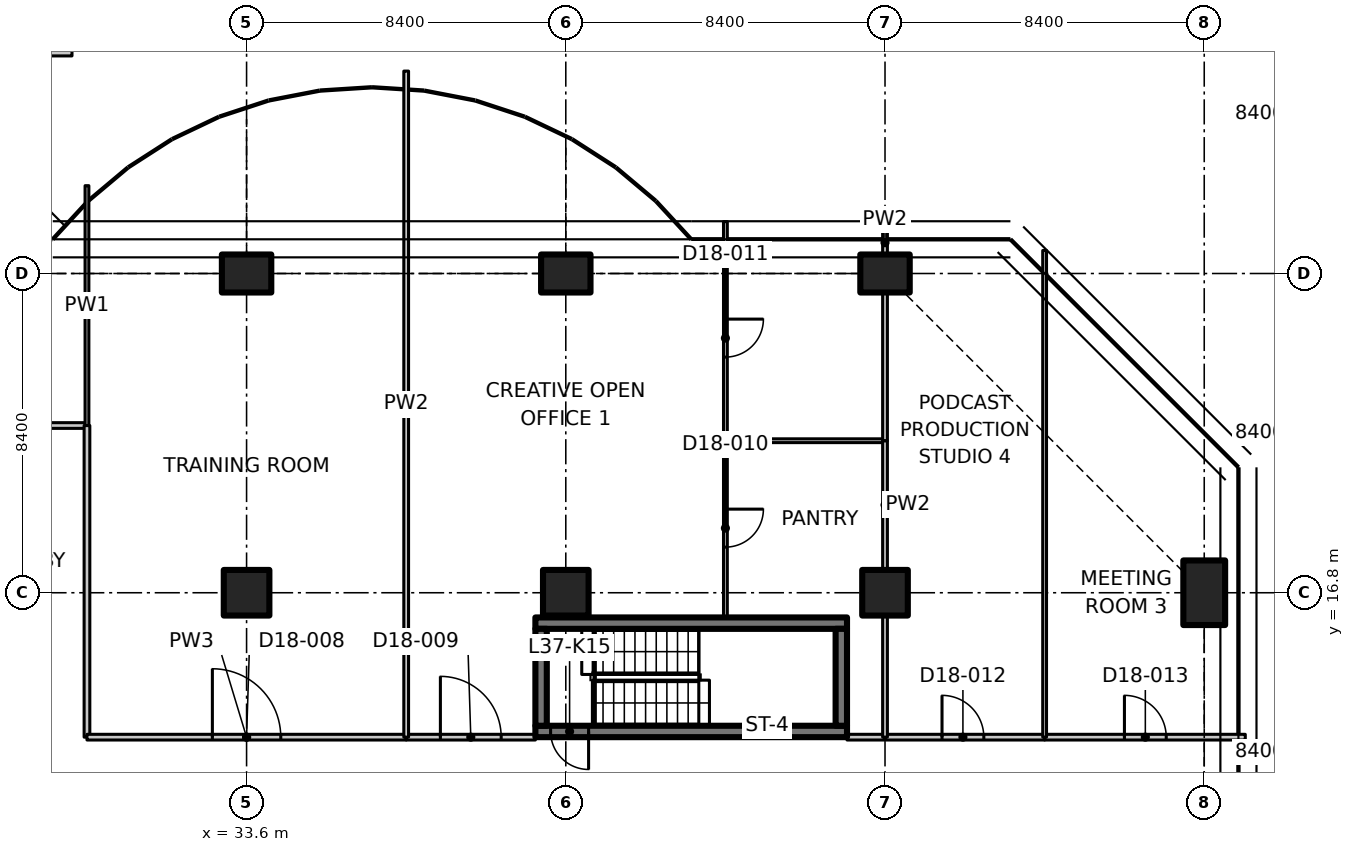
"""IFC4 building model, lengths in metres.
Left out: names, types, materials, properties, quantities, classifications, styles, units other than length and angle.
Written with IfcOpenShell. Run it as: python <this file> out.ifc"""

import sys

from ifc_helpers import new_model, si_unit, direction, frame, frame_2d, origin, origin_2d, place, context, subcontext, project, spatial, polyline, rectangle, outline, extrude, element, fill, save


model = new_model("IFC4")
c1 = context("Model", 3, precision=1e-05, world=origin(), true_north=direction((0.0, 1.0)))
c2 = subcontext(c1, "Body", "Model", "MODEL_VIEW")
j1 = project(units=[si_unit("LENGTHUNIT", "METRE"), si_unit("PLANEANGLEUNIT", "RADIAN")], contexts=[c1])
p1 = place(None, origin())
s1 = spatial("IfcSite", under=j1, at=p1, CompositionType="ELEMENT")
p2 = place(p1, origin())
s2 = spatial("IfcBuilding", under=s1, at=p2, CompositionType="ELEMENT")
p3 = place(p2, frame((0.0, 0.0, 149.3)))
s3 = spatial("IfcBuildingStorey", under=s2, at=p3, CompositionType="ELEMENT", Elevation=149.3)
p4 = place(p3, frame((33.6, 16.8, 0.0), z_axis=(0.0, 0.0, 1.0), x_axis=(1.0, 0.0, 0.0)))
e1 = element("IfcColumn", 1, at=p4, inside=s3, PredefinedType="COLUMN", context=c2, shape_type="SweptSolid", body=[
    extrude(rectangle(XDim=1.2, YDim=1.2, at=origin_2d()), origin(), (0.0, 0.0, 1.0), 3.35),
])
p5 = place(p3, frame((33.6, 25.2, 0.0), z_axis=(0.0, 0.0, 1.0), x_axis=(0.0, 1.0, 0.0)))
e2 = element("IfcColumn", 2, at=p5, inside=s3, PredefinedType="COLUMN", context=c2, shape_type="SweptSolid", body=[
    extrude(rectangle(XDim=1.0, YDim=1.3, at=origin_2d()), origin(), (0.0, 0.0, 1.0), 3.35),
])
p6 = place(p3, frame((42.0, 16.8, 0.0), z_axis=(0.0, 0.0, 1.0), x_axis=(1.0, 0.0, 0.0)))
e3 = element("IfcColumn", 3, at=p6, inside=s3, PredefinedType="COLUMN", context=c2, shape_type="SweptSolid", body=[
    extrude(rectangle(XDim=1.2, YDim=1.2, at=origin_2d()), origin(), (0.0, 0.0, 1.0), 3.35),
])
p7 = place(p3, frame((42.0, 25.2, 0.0), z_axis=(0.0, 0.0, 1.0), x_axis=(0.0, 1.0, 0.0)))
e4 = element("IfcColumn", 4, at=p7, inside=s3, PredefinedType="COLUMN", context=c2, shape_type="SweptSolid", body=[
    extrude(rectangle(XDim=1.0, YDim=1.3, at=origin_2d()), origin(), (0.0, 0.0, 1.0), 3.35),
])
p8 = place(p3, frame((50.4, 16.8, 0.0), z_axis=(0.0, 0.0, 1.0), x_axis=(1.0, 0.0, 0.0)))
e5 = element("IfcColumn", 5, at=p8, inside=s3, PredefinedType="COLUMN", context=c2, shape_type="SweptSolid", body=[
    extrude(rectangle(XDim=1.2, YDim=1.2, at=origin_2d()), origin(), (0.0, 0.0, 1.0), 3.35),
])
p9 = place(p3, frame((50.4, 25.2, 0.0), z_axis=(0.0, 0.0, 1.0), x_axis=(0.0, 1.0, 0.0)))
e6 = element("IfcColumn", 6, at=p9, inside=s3, PredefinedType="COLUMN", context=c2, shape_type="SweptSolid", body=[
    extrude(rectangle(XDim=1.0, YDim=1.3, at=origin_2d()), origin(), (0.0, 0.0, 1.0), 3.35),
])
p10 = place(p3, frame((58.8, 16.8, 0.0), z_axis=(0.0, 0.0, 1.0), x_axis=(1.0, 0.0, 0.0)))
e7 = element("IfcColumn", 7, at=p10, inside=s3, PredefinedType="COLUMN", context=c2, shape_type="SweptSolid", body=[
    extrude(rectangle(XDim=1.1, YDim=1.7, at=origin_2d()), origin(), (0.0, 0.0, 1.0), 3.35),
])
p11 = place(p3, frame((49.4, 13.15, 0.0), z_axis=(0.0, 0.0, 1.0), x_axis=(-1.0, 0.0, 0.0)))
e8 = element("IfcWall", 8, at=p11, inside=s3, PredefinedType="SHEAR", context=c2, shape_type="SweptSolid", body=[
    extrude(rectangle(XDim=8.2, YDim=0.3, at=frame_2d((4.1, 0.0))), origin(), (0.0, 0.0, 1.0), 3.35),
])
p12 = place(p11, frame((6.8, 0.0, 0.0)))
e9 = element("IfcOpeningElement", 9, at=p12, cuts=e8, PredefinedType="OPENING", context=c2, shape_type="SweptSolid", body=[
    extrude(rectangle(XDim=1.0, YDim=2.1, at=frame_2d((0.5, 1.05))), frame((0.0, 0.16, 0.0), z_axis=(0.0, -1.0, 0.0), x_axis=(1.0, 0.0, 0.0)), (0.0, 0.0, 1.0), 0.32),
])
p13 = place(p3, frame((41.2, 16.0, 0.0), z_axis=(0.0, 0.0, 1.0), x_axis=(1.0, 0.0, 0.0)))
e10 = element("IfcWall", 10, at=p13, inside=s3, PredefinedType="SHEAR", context=c2, shape_type="SweptSolid", body=[
    extrude(rectangle(XDim=8.2, YDim=0.3, at=frame_2d((4.1, 0.0))), origin(), (0.0, 0.0, 1.0), 3.35),
])
for number, where, z_axis, x_axis in (
    (11, (41.35, 13.3, 0.0), (0.0, 0.0, 1.0), (0.0, 1.0, 0.0)),
    (12, (49.25, 13.3, 0.0), (0.0, 0.0, 1.0), (0.0, 1.0, 0.0)),
):
    element("IfcWall", number, at=place(p3, frame(where, z_axis=z_axis, x_axis=x_axis)), inside=s3, PredefinedType="SHEAR", context=c2, shape_type="SweptSolid", body=[
        extrude(rectangle(XDim=2.55, YDim=0.3, at=frame_2d((1.275, 0.0))), origin(), (0.0, 0.0, 1.0), 3.35),
    ])
p14 = place(p3, frame((25.2, 21.2, 0.0), z_axis=(0.0, 0.0, 1.0), x_axis=(1.0, 0.0, 0.0)))
e13 = element("IfcWall", 13, at=p14, inside=s3, PredefinedType="PARTITIONING", context=c2, shape_type="SweptSolid", body=[
    extrude(rectangle(XDim=4.2, YDim=0.15, at=frame_2d((2.1, 0.0))), origin(), (0.0, 0.0, 1.0), 3.33),
])
p15 = place(p3, frame((29.4, 21.2, 0.0), z_axis=(0.0, 0.0, 1.0), x_axis=(0.0, -1.0, 0.0)))
e14 = element("IfcWall", 14, at=p15, inside=s3, PredefinedType="PARTITIONING", context=c2, shape_type="SweptSolid", body=[
    extrude(rectangle(XDim=8.2, YDim=0.15, at=frame_2d((4.1, 0.0))), origin(), (0.0, 0.0, 1.0), 3.33),
])
p16 = place(p3, frame((29.4, 27.511, 0.0), z_axis=(0.0, 0.0, 1.0), x_axis=(0.0, -1.0, 0.0)))
e15 = element("IfcWall", 15, at=p16, inside=s3, PredefinedType="PARTITIONING", context=c2, shape_type="SweptSolid", body=[
    extrude(outline(polyline([(0.0, 0.0), (6.311, 0.0), (6.311, 3.33), (2.761, 3.33), (2.759, 2.98), (1.863, 2.98), (1.861, 3.33), (0.236, 3.33), (0.0, 3.33), (0.0, 0.0)])), frame((0.0, 0.05, 0.0), z_axis=(0.0, -1.0, 0.0), x_axis=(1.0, 0.0, 0.0)), (0.0, 0.0, 1.0), 0.1),
])
p17 = place(p3, frame((25.2, 31.0, 0.0), z_axis=(0.0, 0.0, 1.0), x_axis=(1.0, 0.0, 0.0)))
e16 = element("IfcWall", 16, at=p17, inside=s3, PredefinedType="PARTITIONING", context=c2, shape_type="SweptSolid", body=[
    extrude(rectangle(XDim=3.806, YDim=0.15, at=frame_2d((1.903, 0.0))), origin(), (0.0, 0.0, 1.0), 2.98),
])
p18 = place(p3, frame((29.4, 13.0, 0.0), z_axis=(0.0, 0.0, 1.0), x_axis=(1.0, 0.0, 0.0)))
e17 = element("IfcWall", 17, at=p18, inside=s3, PredefinedType="PARTITIONING", context=c2, shape_type="SweptSolid", body=[
    extrude(rectangle(XDim=8.4, YDim=0.15, at=frame_2d((4.2, 0.0))), origin(), (0.0, 0.0, 1.0), 3.33),
])
p19 = place(p18, frame((3.3, 0.0, 0.0)))
e18 = element("IfcOpeningElement", 18, at=p19, cuts=e17, PredefinedType="OPENING", context=c2, shape_type="SweptSolid", body=[
    extrude(rectangle(XDim=1.8, YDim=2.1, at=frame_2d((0.9, 1.05))), frame((0.0, 0.085, 0.0), z_axis=(0.0, -1.0, 0.0), x_axis=(1.0, 0.0, 0.0)), (0.0, 0.0, 1.0), 0.17),
])
p20 = place(p3, frame((37.8, 13.0, 0.0), z_axis=(0.0, 0.0, 1.0), x_axis=(1.0, 0.0, 0.0)))
e19 = element("IfcWall", 19, at=p20, inside=s3, PredefinedType="PARTITIONING", context=c2, shape_type="SweptSolid", body=[
    extrude(rectangle(XDim=3.4, YDim=0.15, at=frame_2d((1.7, 0.0))), origin(), (0.0, 0.0, 1.0), 3.33),
])
p21 = place(p20, frame((0.9, 0.0, 0.0)))
e20 = element("IfcOpeningElement", 20, at=p21, cuts=e19, PredefinedType="OPENING", context=c2, shape_type="SweptSolid", body=[
    extrude(rectangle(XDim=1.6, YDim=2.1, at=frame_2d((0.8, 1.05))), frame((0.0, 0.085, 0.0), z_axis=(0.0, -1.0, 0.0), x_axis=(1.0, 0.0, 0.0)), (0.0, 0.0, 1.0), 0.17),
])
p22 = place(p3, frame((49.4, 13.0, 0.0), z_axis=(0.0, 0.0, 1.0), x_axis=(1.0, 0.0, 0.0)))
e21 = element("IfcWall", 21, at=p22, inside=s3, PredefinedType="PARTITIONING", context=c2, shape_type="SweptSolid", body=[
    extrude(rectangle(XDim=1.0, YDim=0.15, at=frame_2d((0.5, 0.0))), origin(), (0.0, 0.0, 1.0), 3.33),
])
p23 = place(p3, frame((50.4, 13.0, 0.0), z_axis=(0.0, 0.0, 1.0), x_axis=(1.0, 0.0, 0.0)))
e22 = element("IfcWall", 22, at=p23, inside=s3, PredefinedType="PARTITIONING", context=c2, shape_type="SweptSolid", body=[
    extrude(rectangle(XDim=4.2, YDim=0.15, at=frame_2d((2.1, 0.0))), origin(), (0.0, 0.0, 1.0), 3.33),
])
p24 = place(p23, frame((1.5, 0.0, 0.0)))
e23 = element("IfcOpeningElement", 23, at=p24, cuts=e22, PredefinedType="OPENING", context=c2, shape_type="SweptSolid", body=[
    extrude(rectangle(XDim=1.1, YDim=2.1, at=frame_2d((0.55, 1.05))), frame((0.0, 0.085, 0.0), z_axis=(0.0, -1.0, 0.0), x_axis=(1.0, 0.0, 0.0)), (0.0, 0.0, 1.0), 0.17),
])
p25 = place(p3, frame((54.6, 13.0, 0.0), z_axis=(0.0, 0.0, 1.0), x_axis=(1.0, 0.0, 0.0)))
e24 = element("IfcWall", 24, at=p25, inside=s3, PredefinedType="PARTITIONING", context=c2, shape_type="SweptSolid", body=[
    extrude(outline(polyline([(0.0, 0.0), (5.28, 0.0), (5.28, 3.33), (4.65, 3.33), (4.648, 2.98), (3.752, 2.98), (3.75, 3.33), (0.0, 3.33), (0.0, 0.0)])), frame((0.0, 0.075, 0.0), z_axis=(0.0, -1.0, 0.0), x_axis=(1.0, 0.0, 0.0)), (0.0, 0.0, 1.0), 0.15),
])
p26 = place(p25, frame((2.1, 0.0, 0.0)))
e25 = element("IfcOpeningElement", 25, at=p26, cuts=e24, PredefinedType="OPENING", context=c2, shape_type="SweptSolid", body=[
    extrude(rectangle(XDim=1.1, YDim=2.1, at=frame_2d((0.55, 1.05))), frame((0.0, 0.085, 0.0), z_axis=(0.0, -1.0, 0.0), x_axis=(1.0, 0.0, 0.0)), (0.0, 0.0, 1.0), 0.17),
])
p27 = place(p3, frame((37.8, 30.526, 0.0), z_axis=(0.0, 0.0, 1.0), x_axis=(0.0, -1.0, 0.0)))
e26 = element("IfcWall", 26, at=p27, inside=s3, PredefinedType="PARTITIONING", context=c2, shape_type="SweptSolid", body=[
    extrude(outline(polyline([(0.0, 0.0), (17.526, 0.0), (17.526, 3.33), (5.776, 3.33), (5.774, 2.98), (4.878, 2.98), (4.876, 3.33), (0.283, 3.33), (0.0, 3.33), (0.0, 0.0)])), frame((0.0, 0.062, 0.0), z_axis=(0.0, -1.0, 0.0), x_axis=(1.0, 0.0, 0.0)), (0.0, 0.0, 1.0), 0.125),
])
p28 = place(p3, frame((46.2, 20.8, 0.0), z_axis=(0.0, 0.0, 1.0), x_axis=(0.0, -1.0, 0.0)))
e27 = element("IfcWall", 27, at=p28, inside=s3, PredefinedType="PARTITIONING", context=c2, shape_type="SweptSolid", body=[
    extrude(rectangle(XDim=4.65, YDim=0.1, at=frame_2d((2.325, 0.0))), origin(), (0.0, 0.0, 1.0), 3.33),
])
p29 = place(p28, frame((1.8, 0.0, 0.0)))
e28 = element("IfcOpeningElement", 28, at=p29, cuts=e27, PredefinedType="OPENING", context=c2, shape_type="SweptSolid", body=[
    extrude(rectangle(XDim=1.0, YDim=2.1, at=frame_2d((0.5, 1.05))), frame((0.0, 0.06, 0.0), z_axis=(0.0, -1.0, 0.0), x_axis=(1.0, 0.0, 0.0)), (0.0, 0.0, 1.0), 0.12),
])
p30 = place(p3, frame((46.2, 26.565, 0.0), z_axis=(0.0, 0.0, 1.0), x_axis=(0.0, -1.0, 0.0)))
e29 = element("IfcWall", 29, at=p30, inside=s3, PredefinedType="PARTITIONING", context=c2, shape_type="SweptSolid", body=[
    extrude(outline(polyline([(0.0, 0.0), (5.765, 0.0), (5.765, 3.33), (1.815, 3.33), (1.813, 2.98), (0.917, 2.98), (0.915, 3.33), (0.265, 3.33), (0.0, 3.33), (0.0, 0.0)])), frame((0.0, 0.05, 0.0), z_axis=(0.0, -1.0, 0.0), x_axis=(1.0, 0.0, 0.0)), (0.0, 0.0, 1.0), 0.1),
])
p31 = place(p30, frame((2.565, 0.0, 0.0)))
e30 = element("IfcOpeningElement", 30, at=p31, cuts=e29, PredefinedType="OPENING", context=c2, shape_type="SweptSolid", body=[
    extrude(rectangle(XDim=1.0, YDim=2.1, at=frame_2d((0.5, 1.05))), frame((0.0, 0.06, 0.0), z_axis=(0.0, -1.0, 0.0), x_axis=(1.0, 0.0, 0.0)), (0.0, 0.0, 1.0), 0.12),
])
p32 = place(p3, frame((46.2, 20.8, 0.0), z_axis=(0.0, 0.0, 1.0), x_axis=(1.0, 0.0, 0.0)))
e31 = element("IfcWall", 31, at=p32, inside=s3, PredefinedType="PARTITIONING", context=c2, shape_type="SweptSolid", body=[
    extrude(rectangle(XDim=4.2, YDim=0.1, at=frame_2d((2.1, 0.0))), origin(), (0.0, 0.0, 1.0), 3.33),
])
p33 = place(p3, frame((50.4, 20.8, 0.0), z_axis=(0.0, 0.0, 1.0), x_axis=(0.0, -1.0, 0.0)))
e32 = element("IfcWall", 32, at=p33, inside=s3, PredefinedType="PARTITIONING", context=c2, shape_type="SweptSolid", body=[
    extrude(rectangle(XDim=3.38, YDim=0.125, at=frame_2d((1.69, 0.0))), origin(), (0.0, 0.0, 1.0), 3.33),
])
p34 = place(p3, frame((50.4, 16.18, 0.0), z_axis=(0.0, 0.0, 1.0), x_axis=(0.0, -1.0, 0.0)))
e33 = element("IfcWall", 33, at=p34, inside=s3, PredefinedType="PARTITIONING", context=c2, shape_type="SweptSolid", body=[
    extrude(rectangle(XDim=3.18, YDim=0.125, at=frame_2d((1.59, 0.0))), origin(), (0.0, 0.0, 1.0), 3.33),
])
p35 = place(p3, frame((50.4, 26.3, 0.0), z_axis=(0.0, 0.0, 1.0), x_axis=(0.0, -1.0, 0.0)))
e34 = element("IfcWall", 34, at=p35, inside=s3, PredefinedType="PARTITIONING", context=c2, shape_type="SweptSolid", body=[
    extrude(rectangle(XDim=0.58, YDim=0.125, at=frame_2d((0.29, 0.0))), origin(), (0.0, 0.0, 1.0), 3.33),
])
p36 = place(p3, frame((50.4, 24.68, 0.0), z_axis=(0.0, 0.0, 1.0), x_axis=(0.0, -1.0, 0.0)))
e35 = element("IfcWall", 35, at=p36, inside=s3, PredefinedType="PARTITIONING", context=c2, shape_type="SweptSolid", body=[
    extrude(rectangle(XDim=3.88, YDim=0.125, at=frame_2d((1.94, 0.0))), origin(), (0.0, 0.0, 1.0), 2.98),
])
p37 = place(p3, frame((54.6, 25.805, 0.0), z_axis=(0.0, 0.0, 1.0), x_axis=(0.0, -1.0, 0.0)))
e36 = element("IfcWall", 36, at=p37, inside=s3, PredefinedType="PARTITIONING", context=c2, shape_type="SweptSolid", body=[
    extrude(outline(polyline([(0.0, 0.0), (12.805, 0.0), (12.805, 3.33), (5.471, 3.33), (5.469, 2.98), (4.142, 2.98), (4.14, 3.33), (0.406, 3.33), (0.0, 3.33), (0.0, 0.0)])), frame((0.0, 0.05, 0.0), z_axis=(0.0, -1.0, 0.0), x_axis=(1.0, 0.0, 0.0)), (0.0, 0.0, 1.0), 0.1),
])
p38 = place(p12, origin())
e37 = element("IfcDoor", 37, at=p38, inside=s3, OperationType="SINGLE_SWING_LEFT", PredefinedType="DOOR", context=c2, shape_type="SweptSolid", body=[
    extrude(rectangle(XDim=1.0, YDim=2.1, at=frame_2d((0.5, 1.05))), frame((0.0, 0.025, 0.0), z_axis=(0.0, -1.0, 0.0), x_axis=(1.0, 0.0, 0.0)), (0.0, 0.0, 1.0), 0.05),
])
fill(e9, e37)
p39 = place(p19, origin())
e38 = element("IfcDoor", 38, at=p39, inside=s3, OperationType="DOUBLE_DOOR_SINGLE_SWING", PredefinedType="DOOR", context=c2, shape_type="SweptSolid", body=[
    extrude(rectangle(XDim=1.8, YDim=2.1, at=frame_2d((0.9, 1.05))), frame((0.0, 0.025, 0.0), z_axis=(0.0, -1.0, 0.0), x_axis=(1.0, 0.0, 0.0)), (0.0, 0.0, 1.0), 0.05),
])
fill(e18, e38)
p40 = place(p21, origin())
e39 = element("IfcDoor", 39, at=p40, inside=s3, OperationType="DOUBLE_DOOR_SINGLE_SWING", PredefinedType="DOOR", context=c2, shape_type="SweptSolid", body=[
    extrude(rectangle(XDim=1.6, YDim=2.1, at=frame_2d((0.8, 1.05))), frame((0.0, 0.025, 0.0), z_axis=(0.0, -1.0, 0.0), x_axis=(1.0, 0.0, 0.0)), (0.0, 0.0, 1.0), 0.05),
])
fill(e20, e39)
p41 = place(p29, origin())
e40 = element("IfcDoor", 40, at=p41, inside=s3, OperationType="SINGLE_SWING_LEFT", PredefinedType="DOOR", context=c2, shape_type="SweptSolid", body=[
    extrude(rectangle(XDim=1.0, YDim=2.1, at=frame_2d((0.5, 1.05))), frame((0.0, 0.025, 0.0), z_axis=(0.0, -1.0, 0.0), x_axis=(1.0, 0.0, 0.0)), (0.0, 0.0, 1.0), 0.05),
])
fill(e28, e40)
p42 = place(p31, origin())
e41 = element("IfcDoor", 41, at=p42, inside=s3, OperationType="SINGLE_SWING_LEFT", PredefinedType="DOOR", context=c2, shape_type="SweptSolid", body=[
    extrude(rectangle(XDim=1.0, YDim=2.1, at=frame_2d((0.5, 1.05))), frame((0.0, 0.025, 0.0), z_axis=(0.0, -1.0, 0.0), x_axis=(1.0, 0.0, 0.0)), (0.0, 0.0, 1.0), 0.05),
])
fill(e30, e41)
p43 = place(p24, origin())
e42 = element("IfcDoor", 42, at=p43, inside=s3, OperationType="SINGLE_SWING_LEFT", PredefinedType="DOOR", context=c2, shape_type="SweptSolid", body=[
    extrude(rectangle(XDim=1.1, YDim=2.1, at=frame_2d((0.55, 1.05))), frame((0.0, 0.025, 0.0), z_axis=(0.0, -1.0, 0.0), x_axis=(1.0, 0.0, 0.0)), (0.0, 0.0, 1.0), 0.05),
])
fill(e23, e42)
p44 = place(p26, origin())
e43 = element("IfcDoor", 43, at=p44, inside=s3, OperationType="SINGLE_SWING_LEFT", PredefinedType="DOOR", context=c2, shape_type="SweptSolid", body=[
    extrude(rectangle(XDim=1.1, YDim=2.1, at=frame_2d((0.55, 1.05))), frame((0.0, 0.025, 0.0), z_axis=(0.0, -1.0, 0.0), x_axis=(1.0, 0.0, 0.0)), (0.0, 0.0, 1.0), 0.05),
])
fill(e25, e43)
save(model, sys.argv[1])
